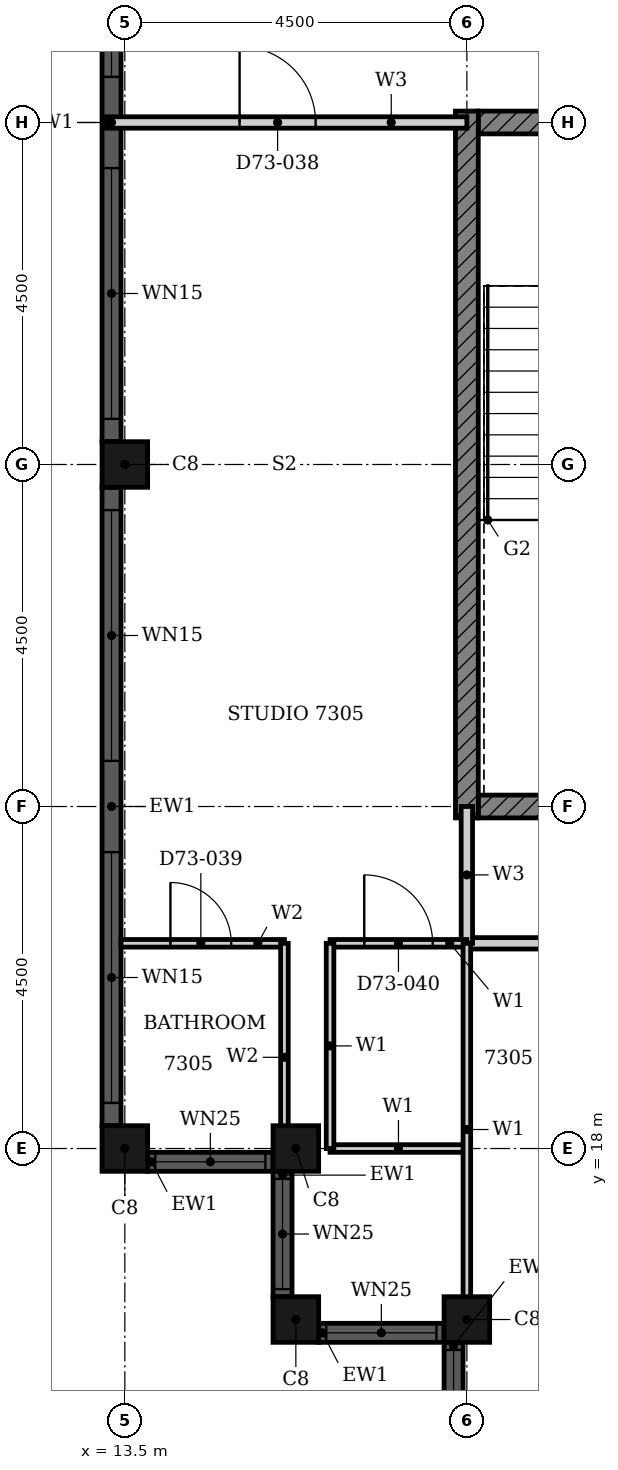
"""IFC4 building model, lengths in metres.
Left out: names, types, materials, properties, quantities, classifications, styles, units other than length and angle.
Written with IfcOpenShell. Run it as: python <this file> out.ifc"""

import sys

from ifc_helpers import new_model, si_unit, direction, frame, frame_2d, origin, origin_2d, place, context, subcontext, project, spatial, rectangle, hollow_rectangle, extrude, element, fill, save


model = new_model("IFC4")
c1 = context("Model", 3, precision=1e-05, world=origin(), true_north=direction((0.0, 1.0)))
c2 = subcontext(c1, "Body", "Model", "MODEL_VIEW")
j1 = project(units=[si_unit("LENGTHUNIT", "METRE"), si_unit("PLANEANGLEUNIT", "RADIAN")], contexts=[c1])
p1 = place(None, origin())
s1 = spatial("IfcSite", under=j1, at=p1, CompositionType="ELEMENT")
p2 = place(p1, origin())
s2 = spatial("IfcBuilding", under=s1, at=p2, CompositionType="ELEMENT")
p3 = place(p2, frame((0.0, 0.0, 287.1)))
s3 = spatial("IfcBuildingStorey", under=s2, at=p3, CompositionType="ELEMENT", Elevation=287.1)
for number, where, z_axis, x_axis in (
    (1, (13.5, 27.0, 0.0), (0.0, 0.0, 1.0), (1.0, 0.0, 0.0)),
    (2, (13.5, 18.0, 0.0), (0.0, 0.0, 1.0), (1.0, 0.0, 0.0)),
    (3, (15.75, 18.0, 0.0), (0.0, 0.0, 1.0), (1.0, 0.0, 0.0)),
    (4, (15.75, 15.75, 0.0), (0.0, 0.0, 1.0), (1.0, 0.0, 0.0)),
    (5, (18.0, 15.75, 0.0), (0.0, 0.0, 1.0), (1.0, 0.0, 0.0)),
):
    element("IfcColumn", number, at=place(p3, frame(where, z_axis=z_axis, x_axis=x_axis)), inside=s3, PredefinedType="COLUMN", context=c2, shape_type="SweptSolid", body=[
        extrude(hollow_rectangle(XDim=0.6, YDim=0.6, WallThickness=0.02, at=origin_2d()), origin(), (0.0, 0.0, 1.0), 3.7),
    ])
p4 = place(p3, frame((13.325, 35.7, 0.0), z_axis=(0.0, 0.0, 1.0), x_axis=(0.0, -1.0, 0.0)))
e6 = element("IfcWall", 6, at=p4, inside=s3, PredefinedType="SOLIDWALL", context=c2, shape_type="SweptSolid", body=[
    extrude(rectangle(XDim=8.4, YDim=0.25, at=frame_2d((4.2, 0.0))), origin(), (0.0, 0.0, 1.0), 3.7),
])
p5 = place(p4, frame((0.3, 0.0, 0.45)))
e7 = element("IfcOpeningElement", 7, at=p5, cuts=e6, PredefinedType="OPENING", context=c2, shape_type="SweptSolid", body=[
    extrude(rectangle(XDim=3.3, YDim=2.3, at=frame_2d((1.65, 1.15))), frame((0.0, 0.135, 0.0), z_axis=(0.0, -1.0, 0.0), x_axis=(1.0, 0.0, 0.0)), (0.0, 0.0, 1.0), 0.27),
])
p6 = place(p4, frame((4.8, 0.0, 0.45)))
e8 = element("IfcOpeningElement", 8, at=p6, cuts=e6, PredefinedType="OPENING", context=c2, shape_type="SweptSolid", body=[
    extrude(rectangle(XDim=3.3, YDim=2.3, at=frame_2d((1.65, 1.15))), frame((0.0, 0.135, 0.0), z_axis=(0.0, -1.0, 0.0), x_axis=(1.0, 0.0, 0.0)), (0.0, 0.0, 1.0), 0.27),
])
p7 = place(p3, frame((13.325, 26.7, 0.0), z_axis=(0.0, 0.0, 1.0), x_axis=(0.0, -1.0, 0.0)))
e9 = element("IfcWall", 9, at=p7, inside=s3, PredefinedType="SOLIDWALL", context=c2, shape_type="SweptSolid", body=[
    extrude(rectangle(XDim=8.4, YDim=0.25, at=frame_2d((4.2, 0.0))), origin(), (0.0, 0.0, 1.0), 3.7),
])
p8 = place(p7, frame((0.3, 0.0, 0.45)))
e10 = element("IfcOpeningElement", 10, at=p8, cuts=e9, PredefinedType="OPENING", context=c2, shape_type="SweptSolid", body=[
    extrude(rectangle(XDim=3.3, YDim=2.3, at=frame_2d((1.65, 1.15))), frame((0.0, 0.135, 0.0), z_axis=(0.0, -1.0, 0.0), x_axis=(1.0, 0.0, 0.0)), (0.0, 0.0, 1.0), 0.27),
])
p9 = place(p7, frame((4.8, 0.0, 0.45)))
e11 = element("IfcOpeningElement", 11, at=p9, cuts=e9, PredefinedType="OPENING", context=c2, shape_type="SweptSolid", body=[
    extrude(rectangle(XDim=3.3, YDim=2.3, at=frame_2d((1.65, 1.15))), frame((0.0, 0.135, 0.0), z_axis=(0.0, -1.0, 0.0), x_axis=(1.0, 0.0, 0.0)), (0.0, 0.0, 1.0), 0.27),
])
p10 = place(p3, frame((13.8, 17.825, 0.0), z_axis=(0.0, 0.0, 1.0), x_axis=(1.0, 0.0, 0.0)))
e12 = element("IfcWall", 12, at=p10, inside=s3, PredefinedType="SOLIDWALL", context=c2, shape_type="SweptSolid", body=[
    extrude(rectangle(XDim=1.65, YDim=0.25, at=frame_2d((0.825, 0.0))), origin(), (0.0, 0.0, 1.0), 3.7),
])
p11 = place(p10, frame((0.1, 0.0, 0.9)))
e13 = element("IfcOpeningElement", 13, at=p11, cuts=e12, PredefinedType="OPENING", context=c2, shape_type="SweptSolid", body=[
    extrude(rectangle(XDim=1.45, YDim=1.85, at=frame_2d((0.725, 0.925))), frame((0.0, 0.135, 0.0), z_axis=(0.0, -1.0, 0.0), x_axis=(1.0, 0.0, 0.0)), (0.0, 0.0, 1.0), 0.27),
])
p12 = place(p3, frame((15.575, 17.7, 0.0), z_axis=(0.0, 0.0, 1.0), x_axis=(0.0, -1.0, 0.0)))
e14 = element("IfcWall", 14, at=p12, inside=s3, PredefinedType="SOLIDWALL", context=c2, shape_type="SweptSolid", body=[
    extrude(rectangle(XDim=1.65, YDim=0.25, at=frame_2d((0.825, 0.0))), origin(), (0.0, 0.0, 1.0), 3.7),
])
p13 = place(p12, frame((0.1, 0.0, 0.9)))
e15 = element("IfcOpeningElement", 15, at=p13, cuts=e14, PredefinedType="OPENING", context=c2, shape_type="SweptSolid", body=[
    extrude(rectangle(XDim=1.45, YDim=1.85, at=frame_2d((0.725, 0.925))), frame((0.0, 0.135, 0.0), z_axis=(0.0, -1.0, 0.0), x_axis=(1.0, 0.0, 0.0)), (0.0, 0.0, 1.0), 0.27),
])
p14 = place(p3, frame((16.05, 15.575, 0.0), z_axis=(0.0, 0.0, 1.0), x_axis=(1.0, 0.0, 0.0)))
e16 = element("IfcWall", 16, at=p14, inside=s3, PredefinedType="SOLIDWALL", context=c2, shape_type="SweptSolid", body=[
    extrude(rectangle(XDim=1.65, YDim=0.25, at=frame_2d((0.825, 0.0))), origin(), (0.0, 0.0, 1.0), 3.7),
])
p15 = place(p14, frame((0.1, 0.0, 0.9)))
e17 = element("IfcOpeningElement", 17, at=p15, cuts=e16, PredefinedType="OPENING", context=c2, shape_type="SweptSolid", body=[
    extrude(rectangle(XDim=1.45, YDim=1.85, at=frame_2d((0.725, 0.925))), frame((0.0, 0.135, 0.0), z_axis=(0.0, -1.0, 0.0), x_axis=(1.0, 0.0, 0.0)), (0.0, 0.0, 1.0), 0.27),
])
p16 = place(p3, frame((17.825, 15.45, 0.0), z_axis=(0.0, 0.0, 1.0), x_axis=(0.0, -1.0, 0.0)))
e18 = element("IfcWall", 18, at=p16, inside=s3, PredefinedType="SOLIDWALL", context=c2, shape_type="SweptSolid", body=[
    extrude(rectangle(XDim=1.65, YDim=0.25, at=frame_2d((0.825, 0.0))), origin(), (0.0, 0.0, 1.0), 3.7),
])
p17 = place(p16, frame((0.1, 0.0, 0.9)))
e19 = element("IfcOpeningElement", 19, at=p17, cuts=e18, PredefinedType="OPENING", context=c2, shape_type="SweptSolid", body=[
    extrude(rectangle(XDim=1.45, YDim=1.85, at=frame_2d((0.725, 0.925))), frame((0.0, 0.135, 0.0), z_axis=(0.0, -1.0, 0.0), x_axis=(1.0, 0.0, 0.0)), (0.0, 0.0, 1.0), 0.27),
])
p18 = place(p3, frame((18.15, 22.5, 0.0), z_axis=(0.0, 0.0, 1.0), x_axis=(1.0, 0.0, 0.0)))
e20 = element("IfcWall", 20, at=p18, inside=s3, PredefinedType="SHEAR", context=c2, shape_type="SweptSolid", body=[
    extrude(rectangle(XDim=4.225, YDim=0.3, at=frame_2d((2.113, 0.0))), origin(), (0.0, 0.0, 1.0), 3.4),
])
p19 = place(p3, frame((18.15, 31.5, 0.0), z_axis=(0.0, 0.0, 1.0), x_axis=(1.0, 0.0, 0.0)))
e21 = element("IfcWall", 21, at=p19, inside=s3, PredefinedType="SHEAR", context=c2, shape_type="SweptSolid", body=[
    extrude(rectangle(XDim=9.368, YDim=0.3, at=frame_2d((4.684, 0.0))), origin(), (0.0, 0.0, 1.0), 3.4),
])
p20 = place(p19, frame((4.736, 0.0, 0.0)))
e22 = element("IfcOpeningElement", 22, at=p20, cuts=e21, PredefinedType="OPENING", context=c2, shape_type="SweptSolid", body=[
    extrude(rectangle(XDim=1.8, YDim=2.1, at=frame_2d((0.9, 1.05))), frame((0.0, 0.16, 0.0), z_axis=(0.0, -1.0, 0.0), x_axis=(1.0, 0.0, 0.0)), (0.0, 0.0, 1.0), 0.32),
])
p21 = place(p3, frame((18.0, 22.35, 0.0), z_axis=(0.0, 0.0, 1.0), x_axis=(0.0, 1.0, 0.0)))
e23 = element("IfcWall", 23, at=p21, inside=s3, PredefinedType="SHEAR", context=c2, shape_type="SweptSolid", body=[
    extrude(rectangle(XDim=9.3, YDim=0.3, at=frame_2d((4.65, 0.0))), origin(), (0.0, 0.0, 1.0), 3.4),
])
p22 = place(p3, frame((18.0, 20.7, 0.0), z_axis=(0.0, 0.0, 1.0), x_axis=(1.0, 0.0, 0.0)))
e24 = element("IfcWall", 24, at=p22, inside=s3, PredefinedType="PARTITIONING", context=c2, shape_type="SweptSolid", body=[
    extrude(rectangle(XDim=9.0, YDim=0.15, at=frame_2d((4.5, 0.0))), origin(), (0.0, 0.0, 1.0), 3.4),
])
p23 = place(p22, frame((4.0, 0.0, 0.0)))
e25 = element("IfcOpeningElement", 25, at=p23, cuts=e24, PredefinedType="OPENING", context=c2, shape_type="SweptSolid", body=[
    extrude(rectangle(XDim=1.0, YDim=2.1, at=frame_2d((0.5, 1.05))), frame((0.0, 0.085, 0.0), z_axis=(0.0, -1.0, 0.0), x_axis=(1.0, 0.0, 0.0)), (0.0, 0.0, 1.0), 0.17),
])
p24 = place(p3, frame((13.26, 31.5, 0.0), z_axis=(0.0, 0.0, 1.0), x_axis=(1.0, 0.0, 0.0)))
e26 = element("IfcWall", 26, at=p24, inside=s3, PredefinedType="PARTITIONING", context=c2, shape_type="SweptSolid", body=[
    extrude(rectangle(XDim=4.74, YDim=0.15, at=frame_2d((2.37, 0.0))), origin(), (0.0, 0.0, 1.0), 3.4),
])
p25 = place(p24, frame((1.75, 0.0, 0.0)))
e27 = element("IfcOpeningElement", 27, at=p25, cuts=e26, PredefinedType="OPENING", context=c2, shape_type="SweptSolid", body=[
    extrude(rectangle(XDim=1.0, YDim=2.2, at=frame_2d((0.5, 1.1))), frame((0.0, 0.085, 0.0), z_axis=(0.0, -1.0, 0.0), x_axis=(1.0, 0.0, 0.0)), (0.0, 0.0, 1.0), 0.17),
])
p26 = place(p3, frame((18.0, 20.7, 0.0), z_axis=(0.0, 0.0, 1.0), x_axis=(0.0, 1.0, 0.0)))
e28 = element("IfcWall", 28, at=p26, inside=s3, PredefinedType="PARTITIONING", context=c2, shape_type="SweptSolid", body=[
    extrude(rectangle(XDim=1.8, YDim=0.15, at=frame_2d((0.9, 0.0))), origin(), (0.0, 0.0, 1.0), 3.4),
])
p27 = place(p3, frame((16.2, 18.0, 0.0), z_axis=(0.0, 0.0, 1.0), x_axis=(1.0, 0.0, 0.0)))
e29 = element("IfcWall", 29, at=p27, inside=s3, PredefinedType="PARTITIONING", context=c2, shape_type="SweptSolid", body=[
    extrude(rectangle(XDim=1.8, YDim=0.1, at=frame_2d((0.9, 0.0))), origin(), (0.0, 0.0, 1.0), 3.4),
])
p28 = place(p3, frame((16.2, 20.7, 0.0), z_axis=(0.0, 0.0, 1.0), x_axis=(1.0, 0.0, 0.0)))
e30 = element("IfcWall", 30, at=p28, inside=s3, PredefinedType="PARTITIONING", context=c2, shape_type="SweptSolid", body=[
    extrude(rectangle(XDim=1.8, YDim=0.1, at=frame_2d((0.9, 0.0))), origin(), (0.0, 0.0, 1.0), 3.4),
])
p29 = place(p28, frame((0.45, 0.0, 0.0)))
e31 = element("IfcOpeningElement", 31, at=p29, cuts=e30, PredefinedType="OPENING", context=c2, shape_type="SweptSolid", body=[
    extrude(rectangle(XDim=0.9, YDim=2.1, at=frame_2d((0.45, 1.05))), frame((0.0, 0.06, 0.0), z_axis=(0.0, -1.0, 0.0), x_axis=(1.0, 0.0, 0.0)), (0.0, 0.0, 1.0), 0.12),
])
p30 = place(p3, frame((16.2, 18.0, 0.0), z_axis=(0.0, 0.0, 1.0), x_axis=(0.0, 1.0, 0.0)))
e32 = element("IfcWall", 32, at=p30, inside=s3, PredefinedType="PARTITIONING", context=c2, shape_type="SweptSolid", body=[
    extrude(rectangle(XDim=2.7, YDim=0.1, at=frame_2d((1.35, 0.0))), origin(), (0.0, 0.0, 1.0), 3.4),
])
p31 = place(p3, frame((18.0, 15.8, 0.0), z_axis=(0.0, 0.0, 1.0), x_axis=(0.0, 1.0, 0.0)))
e33 = element("IfcWall", 33, at=p31, inside=s3, PredefinedType="PARTITIONING", context=c2, shape_type="SweptSolid", body=[
    extrude(rectangle(XDim=4.9, YDim=0.1, at=frame_2d((2.45, 0.0))), origin(), (0.0, 0.0, 1.0), 3.4),
])
p32 = place(p3, frame((13.45, 20.7, 0.0), z_axis=(0.0, 0.0, 1.0), x_axis=(1.0, 0.0, 0.0)))
e34 = element("IfcWall", 34, at=p32, inside=s3, PredefinedType="PARTITIONING", context=c2, shape_type="SweptSolid", body=[
    extrude(rectangle(XDim=2.15, YDim=0.1, at=frame_2d((1.075, 0.0))), origin(), (0.0, 0.0, 1.0), 3.4),
])
p33 = place(p32, frame((0.65, 0.0, 0.0)))
e35 = element("IfcOpeningElement", 35, at=p33, cuts=e34, PredefinedType="OPENING", context=c2, shape_type="SweptSolid", body=[
    extrude(rectangle(XDim=0.8, YDim=2.1, at=frame_2d((0.4, 1.05))), frame((0.0, 0.06, 0.0), z_axis=(0.0, -1.0, 0.0), x_axis=(1.0, 0.0, 0.0)), (0.0, 0.0, 1.0), 0.12),
])
p34 = place(p3, frame((15.6, 17.7, 0.0), z_axis=(0.0, 0.0, 1.0), x_axis=(0.0, 1.0, 0.0)))
e36 = element("IfcWall", 36, at=p34, inside=s3, PredefinedType="PARTITIONING", context=c2, shape_type="SweptSolid", body=[
    extrude(rectangle(XDim=3.0, YDim=0.1, at=frame_2d((1.5, 0.0))), origin(), (0.0, 0.0, 1.0), 3.4),
])
p35 = place(p5, origin())
e37 = element("IfcWindow", 37, at=p35, inside=s3, PartitioningType="SINGLE_PANEL", PredefinedType="WINDOW", context=c2, shape_type="SweptSolid", body=[
    extrude(rectangle(XDim=3.3, YDim=2.3, at=frame_2d((1.65, 1.15))), frame((0.0, 0.03, 0.0), z_axis=(0.0, -1.0, 0.0), x_axis=(1.0, 0.0, 0.0)), (0.0, 0.0, 1.0), 0.06),
])
fill(e7, e37)
p36 = place(p6, origin())
e38 = element("IfcWindow", 38, at=p36, inside=s3, PartitioningType="SINGLE_PANEL", PredefinedType="WINDOW", context=c2, shape_type="SweptSolid", body=[
    extrude(rectangle(XDim=3.3, YDim=2.3, at=frame_2d((1.65, 1.15))), frame((0.0, 0.03, 0.0), z_axis=(0.0, -1.0, 0.0), x_axis=(1.0, 0.0, 0.0)), (0.0, 0.0, 1.0), 0.06),
])
fill(e8, e38)
p37 = place(p8, origin())
e39 = element("IfcWindow", 39, at=p37, inside=s3, PartitioningType="SINGLE_PANEL", PredefinedType="WINDOW", context=c2, shape_type="SweptSolid", body=[
    extrude(rectangle(XDim=3.3, YDim=2.3, at=frame_2d((1.65, 1.15))), frame((0.0, 0.03, 0.0), z_axis=(0.0, -1.0, 0.0), x_axis=(1.0, 0.0, 0.0)), (0.0, 0.0, 1.0), 0.06),
])
fill(e10, e39)
p38 = place(p9, origin())
e40 = element("IfcWindow", 40, at=p38, inside=s3, PartitioningType="SINGLE_PANEL", PredefinedType="WINDOW", context=c2, shape_type="SweptSolid", body=[
    extrude(rectangle(XDim=3.3, YDim=2.3, at=frame_2d((1.65, 1.15))), frame((0.0, 0.03, 0.0), z_axis=(0.0, -1.0, 0.0), x_axis=(1.0, 0.0, 0.0)), (0.0, 0.0, 1.0), 0.06),
])
fill(e11, e40)
p39 = place(p11, origin())
e41 = element("IfcWindow", 41, at=p39, inside=s3, PartitioningType="SINGLE_PANEL", PredefinedType="WINDOW", context=c2, shape_type="SweptSolid", body=[
    extrude(rectangle(XDim=1.45, YDim=1.85, at=frame_2d((0.725, 0.925))), frame((0.0, 0.03, 0.0), z_axis=(0.0, -1.0, 0.0), x_axis=(1.0, 0.0, 0.0)), (0.0, 0.0, 1.0), 0.06),
])
fill(e13, e41)
p40 = place(p13, origin())
e42 = element("IfcWindow", 42, at=p40, inside=s3, PartitioningType="SINGLE_PANEL", PredefinedType="WINDOW", context=c2, shape_type="SweptSolid", body=[
    extrude(rectangle(XDim=1.45, YDim=1.85, at=frame_2d((0.725, 0.925))), frame((0.0, 0.03, 0.0), z_axis=(0.0, -1.0, 0.0), x_axis=(1.0, 0.0, 0.0)), (0.0, 0.0, 1.0), 0.06),
])
fill(e15, e42)
p41 = place(p15, origin())
e43 = element("IfcWindow", 43, at=p41, inside=s3, PartitioningType="SINGLE_PANEL", PredefinedType="WINDOW", context=c2, shape_type="SweptSolid", body=[
    extrude(rectangle(XDim=1.45, YDim=1.85, at=frame_2d((0.725, 0.925))), frame((0.0, 0.03, 0.0), z_axis=(0.0, -1.0, 0.0), x_axis=(1.0, 0.0, 0.0)), (0.0, 0.0, 1.0), 0.06),
])
fill(e17, e43)
p42 = place(p17, origin())
e44 = element("IfcWindow", 44, at=p42, inside=s3, PartitioningType="SINGLE_PANEL", PredefinedType="WINDOW", context=c2, shape_type="SweptSolid", body=[
    extrude(rectangle(XDim=1.45, YDim=1.85, at=frame_2d((0.725, 0.925))), frame((0.0, 0.03, 0.0), z_axis=(0.0, -1.0, 0.0), x_axis=(1.0, 0.0, 0.0)), (0.0, 0.0, 1.0), 0.06),
])
fill(e19, e44)
p43 = place(p25, origin())
e45 = element("IfcDoor", 45, at=p43, inside=s3, OperationType="SINGLE_SWING_RIGHT", PredefinedType="DOOR", context=c2, shape_type="SweptSolid", body=[
    extrude(rectangle(XDim=1.0, YDim=2.2, at=frame_2d((0.5, 1.1))), frame((0.0, 0.025, 0.0), z_axis=(0.0, -1.0, 0.0), x_axis=(1.0, 0.0, 0.0)), (0.0, 0.0, 1.0), 0.05),
])
fill(e27, e45)
p44 = place(p33, origin())
e46 = element("IfcDoor", 46, at=p44, inside=s3, OperationType="SINGLE_SWING_LEFT", PredefinedType="DOOR", context=c2, shape_type="SweptSolid", body=[
    extrude(rectangle(XDim=0.8, YDim=2.1, at=frame_2d((0.4, 1.05))), frame((0.0, 0.025, 0.0), z_axis=(0.0, -1.0, 0.0), x_axis=(1.0, 0.0, 0.0)), (0.0, 0.0, 1.0), 0.05),
])
fill(e35, e46)
p45 = place(p29, origin())
e47 = element("IfcDoor", 47, at=p45, inside=s3, OperationType="SINGLE_SWING_LEFT", PredefinedType="DOOR", context=c2, shape_type="SweptSolid", body=[
    extrude(rectangle(XDim=0.9, YDim=2.1, at=frame_2d((0.45, 1.05))), frame((0.0, 0.025, 0.0), z_axis=(0.0, -1.0, 0.0), x_axis=(1.0, 0.0, 0.0)), (0.0, 0.0, 1.0), 0.05),
])
fill(e31, e47)
save(model, sys.argv[1])
